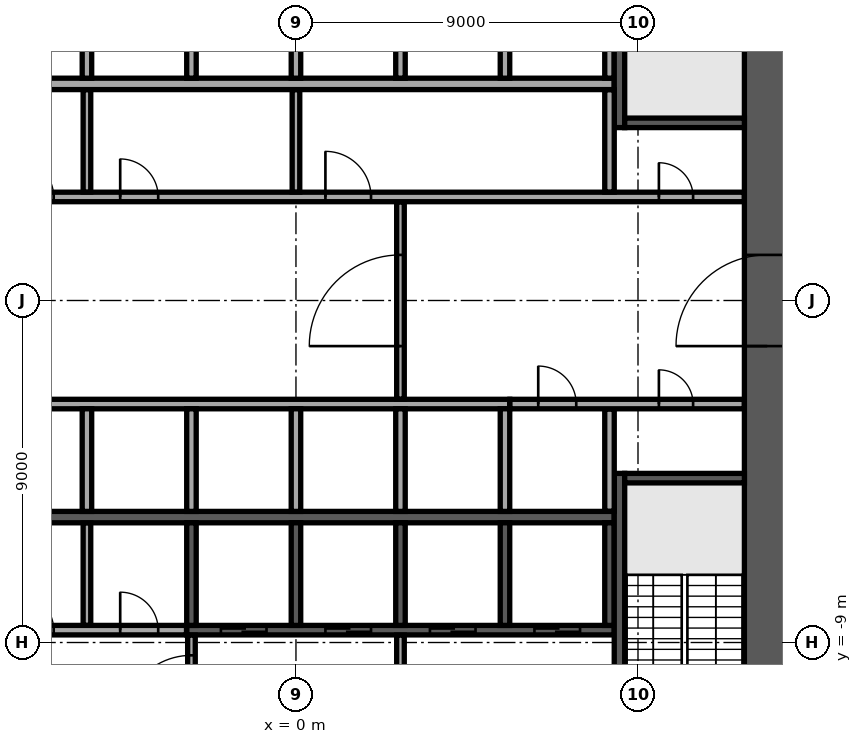
"""IFC4 building model, lengths in metres.
Left out: names, types, materials, properties, quantities, classifications, styles, units other than length and angle.
Written with IfcOpenShell. Run it as: python <this file> out.ifc"""

import sys

from ifc_helpers import new_model, si_unit, direction, frame, frame_2d, origin, place, context, subcontext, project, spatial, rectangle, extrude, element, fill, save


model = new_model("IFC4")
c1 = context("Model", 3, precision=1e-05, world=origin(), true_north=direction((0.0, 1.0)))
c2 = subcontext(c1, "Body", "Model", "MODEL_VIEW")
j1 = project(units=[si_unit("LENGTHUNIT", "METRE"), si_unit("PLANEANGLEUNIT", "RADIAN")], contexts=[c1])
p1 = place(None, origin())
s1 = spatial("IfcSite", under=j1, at=p1, CompositionType="ELEMENT")
p2 = place(p1, origin())
s2 = spatial("IfcBuilding", under=s1, at=p2, CompositionType="ELEMENT")
p3 = place(p2, frame((0.0, 0.0, 4.5)))
s3 = spatial("IfcBuildingStorey", under=s2, at=p3, CompositionType="ELEMENT", Elevation=4.5)
p4 = place(p3, frame((12.4, -11.8, 0.0), z_axis=(0.0, 0.0, 1.0), x_axis=(0.0, 1.0, 0.0)))
e1 = element("IfcWall", 1, at=p4, inside=s3, PredefinedType="SHEAR", context=c2, shape_type="SweptSolid", body=[
    extrude(rectangle(XDim=23.6, YDim=1.2, at=frame_2d((11.8, 0.0))), origin(), (0.0, 0.0, 1.0), 4.1),
])
p5 = place(p4, frame((10.6, 0.0, 0.0)))
e2 = element("IfcOpeningElement", 2, at=p5, cuts=e1, PredefinedType="OPENING", context=c2, shape_type="SweptSolid", body=[
    extrude(rectangle(XDim=2.4, YDim=2.4, at=frame_2d((1.2, 1.2))), frame((0.0, 0.61, 0.0), z_axis=(0.0, -1.0, 0.0), x_axis=(1.0, 0.0, 0.0)), (0.0, 0.0, 1.0), 1.22),
])
for number, where, z_axis, x_axis in (
    (3, (-8.375, 5.7, 0.0), (0.0, 0.0, 1.0), (1.0, 0.0, 0.0)),
    (4, (-8.375, -5.7, 0.0), (0.0, 0.0, 1.0), (1.0, 0.0, 0.0)),
):
    element("IfcWall", number, at=place(p3, frame(where, z_axis=z_axis, x_axis=x_axis)), inside=s3, PredefinedType="SOLIDWALL", context=c2, shape_type="SweptSolid", body=[
        extrude(rectangle(XDim=16.75, YDim=0.3, at=frame_2d((8.375, 0.0))), origin(), (0.0, 0.0, 1.0), 4.1),
    ])
for number, where, z_axis, x_axis in (
    (5, (-5.5, 5.85, 0.0), (0.0, 0.0, 1.0), (0.0, 1.0, 0.0)),
    (6, (-2.75, 5.85, 0.0), (0.0, 0.0, 1.0), (0.0, 1.0, 0.0)),
    (7, (0.0, 5.85, 0.0), (0.0, 0.0, 1.0), (0.0, 1.0, 0.0)),
    (8, (2.75, 5.85, 0.0), (0.0, 0.0, 1.0), (0.0, 1.0, 0.0)),
    (9, (5.5, 5.85, 0.0), (0.0, 0.0, 1.0), (0.0, 1.0, 0.0)),
    (10, (8.25, 5.85, 0.0), (0.0, 0.0, 1.0), (0.0, 1.0, 0.0)),
):
    element("IfcWall", number, at=place(p3, frame(where, z_axis=z_axis, x_axis=x_axis)), inside=s3, PredefinedType="SOLIDWALL", context=c2, shape_type="SweptSolid", body=[
        extrude(rectangle(XDim=2.7, YDim=0.25, at=frame_2d((1.35, 0.0))), origin(), (0.0, 0.0, 1.0), 4.1),
    ])
p6 = place(p3, frame((-8.375, -2.725, 0.0), z_axis=(0.0, 0.0, 1.0), x_axis=(1.0, 0.0, 0.0)))
e11 = element("IfcWall", 11, at=p6, inside=s3, PredefinedType="SOLIDWALL", context=c2, shape_type="SweptSolid", body=[
    extrude(rectangle(XDim=14.0, YDim=0.25, at=frame_2d((7.0, 0.0))), origin(), (0.0, 0.0, 1.0), 4.1),
])
for number, where, z_axis, x_axis in (
    (12, (-5.5, -5.55, 0.0), (0.0, 0.0, 1.0), (0.0, 1.0, 0.0)),
    (13, (-2.75, -5.55, 0.0), (0.0, 0.0, 1.0), (0.0, 1.0, 0.0)),
    (14, (0.0, -5.55, 0.0), (0.0, 0.0, 1.0), (0.0, 1.0, 0.0)),
    (15, (2.75, -5.55, 0.0), (0.0, 0.0, 1.0), (0.0, 1.0, 0.0)),
    (16, (5.5, -5.55, 0.0), (0.0, 0.0, 1.0), (0.0, 1.0, 0.0)),
):
    element("IfcWall", number, at=place(p3, frame(where, z_axis=z_axis, x_axis=x_axis)), inside=s3, PredefinedType="SOLIDWALL", context=c2, shape_type="SweptSolid", body=[
        extrude(rectangle(XDim=2.7, YDim=0.25, at=frame_2d((1.35, 0.0))), origin(), (0.0, 0.0, 1.0), 4.1),
    ])
p7 = place(p3, frame((-2.875, -8.675, 0.0), z_axis=(0.0, 0.0, 1.0), x_axis=(1.0, 0.0, 0.0)))
e17 = element("IfcWall", 17, at=p7, inside=s3, PredefinedType="SOLIDWALL", context=c2, shape_type="SweptSolid", body=[
    extrude(rectangle(XDim=11.25, YDim=0.25, at=frame_2d((5.625, 0.0))), origin(), (0.0, 0.0, 1.0), 4.1),
])
p8 = place(p7, frame((0.9, 0.0, 0.0)))
e18 = element("IfcOpeningElement", 18, at=p8, cuts=e17, PredefinedType="OPENING", context=c2, shape_type="SweptSolid", body=[
    extrude(rectangle(XDim=1.2, YDim=2.1, at=frame_2d((0.6, 1.05))), frame((0.0, 0.135, 0.0), z_axis=(0.0, -1.0, 0.0), x_axis=(1.0, 0.0, 0.0)), (0.0, 0.0, 1.0), 0.27),
])
p9 = place(p7, frame((3.65, 0.0, 0.0)))
e19 = element("IfcOpeningElement", 19, at=p9, cuts=e17, PredefinedType="OPENING", context=c2, shape_type="SweptSolid", body=[
    extrude(rectangle(XDim=1.2, YDim=2.1, at=frame_2d((0.6, 1.05))), frame((0.0, 0.135, 0.0), z_axis=(0.0, -1.0, 0.0), x_axis=(1.0, 0.0, 0.0)), (0.0, 0.0, 1.0), 0.27),
])
p10 = place(p7, frame((6.4, 0.0, 0.0)))
e20 = element("IfcOpeningElement", 20, at=p10, cuts=e17, PredefinedType="OPENING", context=c2, shape_type="SweptSolid", body=[
    extrude(rectangle(XDim=1.2, YDim=2.1, at=frame_2d((0.6, 1.05))), frame((0.0, 0.135, 0.0), z_axis=(0.0, -1.0, 0.0), x_axis=(1.0, 0.0, 0.0)), (0.0, 0.0, 1.0), 0.27),
])
p11 = place(p7, frame((9.15, 0.0, 0.0)))
e21 = element("IfcOpeningElement", 21, at=p11, cuts=e17, PredefinedType="OPENING", context=c2, shape_type="SweptSolid", body=[
    extrude(rectangle(XDim=1.2, YDim=2.1, at=frame_2d((0.6, 1.05))), frame((0.0, 0.135, 0.0), z_axis=(0.0, -1.0, 0.0), x_axis=(1.0, 0.0, 0.0)), (0.0, 0.0, 1.0), 0.27),
])
for number, where, z_axis, x_axis in (
    (22, (-2.75, -8.55, 0.0), (0.0, 0.0, 1.0), (0.0, 1.0, 0.0)),
    (23, (0.0, -8.55, 0.0), (0.0, 0.0, 1.0), (0.0, 1.0, 0.0)),
    (24, (2.75, -8.55, 0.0), (0.0, 0.0, 1.0), (0.0, 1.0, 0.0)),
    (25, (5.5, -8.55, 0.0), (0.0, 0.0, 1.0), (0.0, 1.0, 0.0)),
    (26, (8.25, -8.55, 0.0), (0.0, 0.0, 1.0), (0.0, 1.0, 0.0)),
):
    element("IfcWall", number, at=place(p3, frame(where, z_axis=z_axis, x_axis=x_axis)), inside=s3, PredefinedType="SOLIDWALL", context=c2, shape_type="SweptSolid", body=[
        extrude(rectangle(XDim=2.7, YDim=0.25, at=frame_2d((1.35, 0.0))), origin(), (0.0, 0.0, 1.0), 4.1),
    ])
p12 = place(p3, frame((8.512, 4.55, 0.0), z_axis=(0.0, 0.0, 1.0), x_axis=(0.0, 1.0, 0.0)))
e27 = element("IfcWall", 27, at=p12, inside=s3, PredefinedType="SOLIDWALL", context=c2, shape_type="SweptSolid", body=[
    extrude(rectangle(XDim=7.25, YDim=0.275, at=frame_2d((3.625, 0.0))), origin(), (0.0, 0.0, 1.0), 4.1),
])
p13 = place(p12, frame((6.0, 0.0, 0.0)))
e28 = element("IfcOpeningElement", 28, at=p13, cuts=e27, PredefinedType="OPENING", context=c2, shape_type="SweptSolid", body=[
    extrude(rectangle(XDim=1.0, YDim=2.1, at=frame_2d((0.5, 1.05))), frame((0.0, 0.147, 0.0), z_axis=(0.0, -1.0, 0.0), x_axis=(1.0, 0.0, 0.0)), (0.0, 0.0, 1.0), 0.295),
])
p14 = place(p3, frame((8.65, 4.675, 0.0), z_axis=(0.0, 0.0, 1.0), x_axis=(1.0, 0.0, 0.0)))
e29 = element("IfcWall", 29, at=p14, inside=s3, PredefinedType="SOLIDWALL", context=c2, shape_type="SweptSolid", body=[
    extrude(rectangle(XDim=3.15, YDim=0.25, at=frame_2d((1.575, 0.0))), origin(), (0.0, 0.0, 1.0), 4.1),
])
p15 = place(p3, frame((8.512, -4.55, 0.0), z_axis=(0.0, 0.0, 1.0), x_axis=(0.0, -1.0, 0.0)))
e30 = element("IfcWall", 30, at=p15, inside=s3, PredefinedType="SOLIDWALL", context=c2, shape_type="SweptSolid", body=[
    extrude(rectangle(XDim=7.25, YDim=0.275, at=frame_2d((3.625, 0.0))), origin(), (0.0, 0.0, 1.0), 4.1),
])
p16 = place(p15, frame((6.0, 0.0, 0.0)))
e31 = element("IfcOpeningElement", 31, at=p16, cuts=e30, PredefinedType="OPENING", context=c2, shape_type="SweptSolid", body=[
    extrude(rectangle(XDim=1.0, YDim=2.1, at=frame_2d((0.5, 1.05))), frame((0.0, 0.147, 0.0), z_axis=(0.0, -1.0, 0.0), x_axis=(1.0, 0.0, 0.0)), (0.0, 0.0, 1.0), 0.295),
])
p17 = place(p3, frame((8.65, -4.675, 0.0), z_axis=(0.0, 0.0, 1.0), x_axis=(1.0, 0.0, 0.0)))
e32 = element("IfcWall", 32, at=p17, inside=s3, PredefinedType="SOLIDWALL", context=c2, shape_type="SweptSolid", body=[
    extrude(rectangle(XDim=3.15, YDim=0.25, at=frame_2d((1.575, 0.0))), origin(), (0.0, 0.0, 1.0), 4.1),
])
p18 = place(p3, frame((-2.75, -11.795, 0.0), z_axis=(0.0, 0.0, 1.0), x_axis=(0.0, 1.0, 0.0)))
e33 = element("IfcWall", 33, at=p18, inside=s3, PredefinedType="PARTITIONING", context=c2, shape_type="SweptSolid", body=[
    extrude(rectangle(XDim=2.99, YDim=0.2, at=frame_2d((1.495, 0.0))), origin(), (0.0, 0.0, 1.0), 4.1),
])
p19 = place(p18, frame((0.657, 0.0, 0.0)))
e34 = element("IfcOpeningElement", 34, at=p19, cuts=e33, PredefinedType="OPENING", context=c2, shape_type="SweptSolid", body=[
    extrude(rectangle(XDim=1.8, YDim=2.1, at=frame_2d((0.9, 1.05))), frame((0.0, 0.11, 0.0), z_axis=(0.0, -1.0, 0.0), x_axis=(1.0, 0.0, 0.0)), (0.0, 0.0, 1.0), 0.22),
])
p20 = place(p3, frame((2.75, -11.795, 0.0), z_axis=(0.0, 0.0, 1.0), x_axis=(0.0, 1.0, 0.0)))
e35 = element("IfcWall", 35, at=p20, inside=s3, PredefinedType="PARTITIONING", context=c2, shape_type="SweptSolid", body=[
    extrude(rectangle(XDim=2.99, YDim=0.2, at=frame_2d((1.495, 0.0))), origin(), (0.0, 0.0, 1.0), 4.1),
])
p21 = place(p3, frame((-8.37, -8.675, 0.0), z_axis=(0.0, 0.0, 1.0), x_axis=(1.0, 0.0, 0.0)))
e36 = element("IfcWall", 36, at=p21, inside=s3, PredefinedType="PARTITIONING", context=c2, shape_type="SweptSolid", body=[
    extrude(rectangle(XDim=5.49, YDim=0.25, at=frame_2d((2.745, 0.0))), origin(), (0.0, 0.0, 1.0), 4.1),
])
p22 = place(p21, frame((0.995, 0.0, 0.0)))
e37 = element("IfcOpeningElement", 37, at=p22, cuts=e36, PredefinedType="OPENING", context=c2, shape_type="SweptSolid", body=[
    extrude(rectangle(XDim=1.0, YDim=2.1, at=frame_2d((0.5, 1.05))), frame((0.0, 0.135, 0.0), z_axis=(0.0, -1.0, 0.0), x_axis=(1.0, 0.0, 0.0)), (0.0, 0.0, 1.0), 0.27),
])
p23 = place(p21, frame((3.745, 0.0, 0.0)))
e38 = element("IfcOpeningElement", 38, at=p23, cuts=e36, PredefinedType="OPENING", context=c2, shape_type="SweptSolid", body=[
    extrude(rectangle(XDim=1.0, YDim=2.1, at=frame_2d((0.5, 1.05))), frame((0.0, 0.135, 0.0), z_axis=(0.0, -1.0, 0.0), x_axis=(1.0, 0.0, 0.0)), (0.0, 0.0, 1.0), 0.27),
])
p24 = place(p3, frame((-5.5, -8.545, 0.0), z_axis=(0.0, 0.0, 1.0), x_axis=(0.0, 1.0, 0.0)))
e39 = element("IfcWall", 39, at=p24, inside=s3, PredefinedType="PARTITIONING", context=c2, shape_type="SweptSolid", body=[
    extrude(rectangle(XDim=2.69, YDim=0.2, at=frame_2d((1.345, 0.0))), origin(), (0.0, 0.0, 1.0), 4.1),
])
p25 = place(p3, frame((8.25, -5.545, 0.0), z_axis=(0.0, 0.0, 1.0), x_axis=(0.0, 1.0, 0.0)))
e40 = element("IfcWall", 40, at=p25, inside=s3, PredefinedType="PARTITIONING", context=c2, shape_type="SweptSolid", body=[
    extrude(rectangle(XDim=2.69, YDim=0.25, at=frame_2d((1.345, 0.0))), origin(), (0.0, 0.0, 1.0), 4.1),
])
p26 = place(p3, frame((5.63, -2.725, 0.0), z_axis=(0.0, 0.0, 1.0), x_axis=(1.0, 0.0, 0.0)))
e41 = element("IfcWall", 41, at=p26, inside=s3, PredefinedType="PARTITIONING", context=c2, shape_type="SweptSolid", body=[
    extrude(rectangle(XDim=6.165, YDim=0.25, at=frame_2d((3.083, 0.0))), origin(), (0.0, 0.0, 1.0), 4.1),
])
p27 = place(p26, frame((0.745, 0.0, 0.0)))
e42 = element("IfcOpeningElement", 42, at=p27, cuts=e41, PredefinedType="OPENING", context=c2, shape_type="SweptSolid", body=[
    extrude(rectangle(XDim=1.0, YDim=2.1, at=frame_2d((0.5, 1.05))), frame((0.0, 0.135, 0.0), z_axis=(0.0, -1.0, 0.0), x_axis=(1.0, 0.0, 0.0)), (0.0, 0.0, 1.0), 0.27),
])
p28 = place(p26, frame((3.92, 0.0, 0.0)))
e43 = element("IfcOpeningElement", 43, at=p28, cuts=e41, PredefinedType="OPENING", context=c2, shape_type="SweptSolid", body=[
    extrude(rectangle(XDim=0.9, YDim=2.1, at=frame_2d((0.45, 1.05))), frame((0.0, 0.135, 0.0), z_axis=(0.0, -1.0, 0.0), x_axis=(1.0, 0.0, 0.0)), (0.0, 0.0, 1.0), 0.27),
])
p29 = place(p3, frame((2.75, -2.595, 0.0), z_axis=(0.0, 0.0, 1.0), x_axis=(0.0, 1.0, 0.0)))
e44 = element("IfcWall", 44, at=p29, inside=s3, PredefinedType="PARTITIONING", context=c2, shape_type="SweptSolid", body=[
    extrude(rectangle(XDim=5.19, YDim=0.2, at=frame_2d((2.595, 0.0))), origin(), (0.0, 0.0, 1.0), 4.1),
])
p30 = place(p29, frame((1.395, 0.0, 0.0)))
e45 = element("IfcOpeningElement", 45, at=p30, cuts=e44, PredefinedType="OPENING", context=c2, shape_type="SweptSolid", body=[
    extrude(rectangle(XDim=2.4, YDim=2.4, at=frame_2d((1.2, 1.2))), frame((0.0, 0.11, 0.0), z_axis=(0.0, -1.0, 0.0), x_axis=(1.0, 0.0, 0.0)), (0.0, 0.0, 1.0), 0.22),
])
p31 = place(p3, frame((-11.795, 2.725, 0.0), z_axis=(0.0, 0.0, 1.0), x_axis=(1.0, 0.0, 0.0)))
e46 = element("IfcWall", 46, at=p31, inside=s3, PredefinedType="PARTITIONING", context=c2, shape_type="SweptSolid", body=[
    extrude(rectangle(XDim=23.59, YDim=0.25, at=frame_2d((11.795, 0.0))), origin(), (0.0, 0.0, 1.0), 4.1),
])
p32 = place(p31, frame((21.345, 0.0, 0.0)))
e47 = element("IfcOpeningElement", 47, at=p32, cuts=e46, PredefinedType="OPENING", context=c2, shape_type="SweptSolid", body=[
    extrude(rectangle(XDim=0.9, YDim=2.1, at=frame_2d((0.45, 1.05))), frame((0.0, 0.135, 0.0), z_axis=(0.0, -1.0, 0.0), x_axis=(1.0, 0.0, 0.0)), (0.0, 0.0, 1.0), 0.27),
])
p33 = place(p31, frame((1.345, 0.0, 0.0)))
e48 = element("IfcOpeningElement", 48, at=p33, cuts=e46, PredefinedType="OPENING", context=c2, shape_type="SweptSolid", body=[
    extrude(rectangle(XDim=0.9, YDim=2.1, at=frame_2d((0.45, 1.05))), frame((0.0, 0.135, 0.0), z_axis=(0.0, -1.0, 0.0), x_axis=(1.0, 0.0, 0.0)), (0.0, 0.0, 1.0), 0.27),
])
p34 = place(p31, frame((4.42, 0.0, 0.0)))
e49 = element("IfcOpeningElement", 49, at=p34, cuts=e46, PredefinedType="OPENING", context=c2, shape_type="SweptSolid", body=[
    extrude(rectangle(XDim=1.0, YDim=2.1, at=frame_2d((0.5, 1.05))), frame((0.0, 0.135, 0.0), z_axis=(0.0, -1.0, 0.0), x_axis=(1.0, 0.0, 0.0)), (0.0, 0.0, 1.0), 0.27),
])
p35 = place(p31, frame((7.17, 0.0, 0.0)))
e50 = element("IfcOpeningElement", 50, at=p35, cuts=e46, PredefinedType="OPENING", context=c2, shape_type="SweptSolid", body=[
    extrude(rectangle(XDim=1.0, YDim=2.1, at=frame_2d((0.5, 1.05))), frame((0.0, 0.135, 0.0), z_axis=(0.0, -1.0, 0.0), x_axis=(1.0, 0.0, 0.0)), (0.0, 0.0, 1.0), 0.27),
])
p36 = place(p31, frame((12.57, 0.0, 0.0)))
e51 = element("IfcOpeningElement", 51, at=p36, cuts=e46, PredefinedType="OPENING", context=c2, shape_type="SweptSolid", body=[
    extrude(rectangle(XDim=1.2, YDim=2.1, at=frame_2d((0.6, 1.05))), frame((0.0, 0.135, 0.0), z_axis=(0.0, -1.0, 0.0), x_axis=(1.0, 0.0, 0.0)), (0.0, 0.0, 1.0), 0.27),
])
for number, where, z_axis, x_axis in (
    (52, (-5.5, 2.855, 0.0), (0.0, 0.0, 1.0), (0.0, 1.0, 0.0)),
    (53, (0.0, 2.855, 0.0), (0.0, 0.0, 1.0), (0.0, 1.0, 0.0)),
):
    element("IfcWall", number, at=place(p3, frame(where, z_axis=z_axis, x_axis=x_axis)), inside=s3, PredefinedType="PARTITIONING", context=c2, shape_type="SweptSolid", body=[
        extrude(rectangle(XDim=2.69, YDim=0.2, at=frame_2d((1.345, 0.0))), origin(), (0.0, 0.0, 1.0), 4.1),
    ])
p37 = place(p3, frame((8.25, 2.855, 0.0), z_axis=(0.0, 0.0, 1.0), x_axis=(0.0, 1.0, 0.0)))
e54 = element("IfcWall", 54, at=p37, inside=s3, PredefinedType="PARTITIONING", context=c2, shape_type="SweptSolid", body=[
    extrude(rectangle(XDim=2.69, YDim=0.25, at=frame_2d((1.345, 0.0))), origin(), (0.0, 0.0, 1.0), 4.1),
])
p38 = place(p5, origin())
e55 = element("IfcDoor", 55, at=p38, inside=s3, OperationType="SINGLE_SWING_LEFT", PredefinedType="DOOR", context=c2, shape_type="SweptSolid", body=[
    extrude(rectangle(XDim=2.4, YDim=2.4, at=frame_2d((1.2, 1.2))), frame((0.0, 0.025, 0.0), z_axis=(0.0, -1.0, 0.0), x_axis=(1.0, 0.0, 0.0)), (0.0, 0.0, 1.0), 0.05),
])
fill(e2, e55)
p39 = place(p8, origin())
e56 = element("IfcDoor", 56, at=p39, inside=s3, OperationType="DOUBLE_DOOR_SLIDING", PredefinedType="DOOR", context=c2, shape_type="SweptSolid", body=[
    extrude(rectangle(XDim=1.2, YDim=2.1, at=frame_2d((0.6, 1.05))), frame((0.0, 0.025, 0.0), z_axis=(0.0, -1.0, 0.0), x_axis=(1.0, 0.0, 0.0)), (0.0, 0.0, 1.0), 0.05),
])
fill(e18, e56)
p40 = place(p9, origin())
e57 = element("IfcDoor", 57, at=p40, inside=s3, OperationType="DOUBLE_DOOR_SLIDING", PredefinedType="DOOR", context=c2, shape_type="SweptSolid", body=[
    extrude(rectangle(XDim=1.2, YDim=2.1, at=frame_2d((0.6, 1.05))), frame((0.0, 0.025, 0.0), z_axis=(0.0, -1.0, 0.0), x_axis=(1.0, 0.0, 0.0)), (0.0, 0.0, 1.0), 0.05),
])
fill(e19, e57)
p41 = place(p10, origin())
e58 = element("IfcDoor", 58, at=p41, inside=s3, OperationType="DOUBLE_DOOR_SLIDING", PredefinedType="DOOR", context=c2, shape_type="SweptSolid", body=[
    extrude(rectangle(XDim=1.2, YDim=2.1, at=frame_2d((0.6, 1.05))), frame((0.0, 0.025, 0.0), z_axis=(0.0, -1.0, 0.0), x_axis=(1.0, 0.0, 0.0)), (0.0, 0.0, 1.0), 0.05),
])
fill(e20, e58)
p42 = place(p11, origin())
e59 = element("IfcDoor", 59, at=p42, inside=s3, OperationType="DOUBLE_DOOR_SLIDING", PredefinedType="DOOR", context=c2, shape_type="SweptSolid", body=[
    extrude(rectangle(XDim=1.2, YDim=2.1, at=frame_2d((0.6, 1.05))), frame((0.0, 0.025, 0.0), z_axis=(0.0, -1.0, 0.0), x_axis=(1.0, 0.0, 0.0)), (0.0, 0.0, 1.0), 0.05),
])
fill(e21, e59)
p43 = place(p22, origin())
e60 = element("IfcDoor", 60, at=p43, inside=s3, OperationType="SINGLE_SWING_RIGHT", PredefinedType="DOOR", context=c2, shape_type="SweptSolid", body=[
    extrude(rectangle(XDim=1.0, YDim=2.1, at=frame_2d((0.5, 1.05))), frame((0.0, 0.025, 0.0), z_axis=(0.0, -1.0, 0.0), x_axis=(1.0, 0.0, 0.0)), (0.0, 0.0, 1.0), 0.05),
])
fill(e37, e60)
p44 = place(p23, origin())
e61 = element("IfcDoor", 61, at=p44, inside=s3, OperationType="SINGLE_SWING_RIGHT", PredefinedType="DOOR", context=c2, shape_type="SweptSolid", body=[
    extrude(rectangle(XDim=1.0, YDim=2.1, at=frame_2d((0.5, 1.05))), frame((0.0, 0.025, 0.0), z_axis=(0.0, -1.0, 0.0), x_axis=(1.0, 0.0, 0.0)), (0.0, 0.0, 1.0), 0.05),
])
fill(e38, e61)
p45 = place(p27, origin())
e62 = element("IfcDoor", 62, at=p45, inside=s3, OperationType="SINGLE_SWING_RIGHT", PredefinedType="DOOR", context=c2, shape_type="SweptSolid", body=[
    extrude(rectangle(XDim=1.0, YDim=2.1, at=frame_2d((0.5, 1.05))), frame((0.0, 0.025, 0.0), z_axis=(0.0, -1.0, 0.0), x_axis=(1.0, 0.0, 0.0)), (0.0, 0.0, 1.0), 0.05),
])
fill(e42, e62)
p46 = place(p32, origin())
e63 = element("IfcDoor", 63, at=p46, inside=s3, OperationType="SINGLE_SWING_RIGHT", PredefinedType="DOOR", context=c2, shape_type="SweptSolid", body=[
    extrude(rectangle(XDim=0.9, YDim=2.1, at=frame_2d((0.45, 1.05))), frame((0.0, 0.025, 0.0), z_axis=(0.0, -1.0, 0.0), x_axis=(1.0, 0.0, 0.0)), (0.0, 0.0, 1.0), 0.05),
])
fill(e47, e63)
p47 = place(p28, origin())
e64 = element("IfcDoor", 64, at=p47, inside=s3, OperationType="SINGLE_SWING_RIGHT", PredefinedType="DOOR", context=c2, shape_type="SweptSolid", body=[
    extrude(rectangle(XDim=0.9, YDim=2.1, at=frame_2d((0.45, 1.05))), frame((0.0, 0.025, 0.0), z_axis=(0.0, -1.0, 0.0), x_axis=(1.0, 0.0, 0.0)), (0.0, 0.0, 1.0), 0.05),
])
fill(e43, e64)
p48 = place(p34, origin())
e65 = element("IfcDoor", 65, at=p48, inside=s3, OperationType="SINGLE_SWING_RIGHT", PredefinedType="DOOR", context=c2, shape_type="SweptSolid", body=[
    extrude(rectangle(XDim=1.0, YDim=2.1, at=frame_2d((0.5, 1.05))), frame((0.0, 0.025, 0.0), z_axis=(0.0, -1.0, 0.0), x_axis=(1.0, 0.0, 0.0)), (0.0, 0.0, 1.0), 0.05),
])
fill(e49, e65)
p49 = place(p35, origin())
e66 = element("IfcDoor", 66, at=p49, inside=s3, OperationType="SINGLE_SWING_RIGHT", PredefinedType="DOOR", context=c2, shape_type="SweptSolid", body=[
    extrude(rectangle(XDim=1.0, YDim=2.1, at=frame_2d((0.5, 1.05))), frame((0.0, 0.025, 0.0), z_axis=(0.0, -1.0, 0.0), x_axis=(1.0, 0.0, 0.0)), (0.0, 0.0, 1.0), 0.05),
])
fill(e50, e66)
p50 = place(p36, origin())
e67 = element("IfcDoor", 67, at=p50, inside=s3, OperationType="SINGLE_SWING_LEFT", PredefinedType="DOOR", context=c2, shape_type="SweptSolid", body=[
    extrude(rectangle(XDim=1.2, YDim=2.1, at=frame_2d((0.6, 1.05))), frame((0.0, 0.025, 0.0), z_axis=(0.0, -1.0, 0.0), x_axis=(1.0, 0.0, 0.0)), (0.0, 0.0, 1.0), 0.05),
])
fill(e51, e67)
p51 = place(p30, origin())
e68 = element("IfcDoor", 68, at=p51, inside=s3, OperationType="DOUBLE_DOOR_DOUBLE_SWING", PredefinedType="DOOR", context=c2, shape_type="SweptSolid", body=[
    extrude(rectangle(XDim=2.4, YDim=2.4, at=frame_2d((1.2, 1.2))), frame((0.0, 0.025, 0.0), z_axis=(0.0, -1.0, 0.0), x_axis=(1.0, 0.0, 0.0)), (0.0, 0.0, 1.0), 0.05),
])
fill(e45, e68)
p52 = place(p19, origin())
e69 = element("IfcDoor", 69, at=p52, inside=s3, OperationType="SINGLE_SWING_LEFT", PredefinedType="DOOR", context=c2, shape_type="SweptSolid", body=[
    extrude(rectangle(XDim=1.8, YDim=2.1, at=frame_2d((0.9, 1.05))), frame((0.0, 0.025, 0.0), z_axis=(0.0, -1.0, 0.0), x_axis=(1.0, 0.0, 0.0)), (0.0, 0.0, 1.0), 0.05),
])
fill(e34, e69)
save(model, sys.argv[1])
